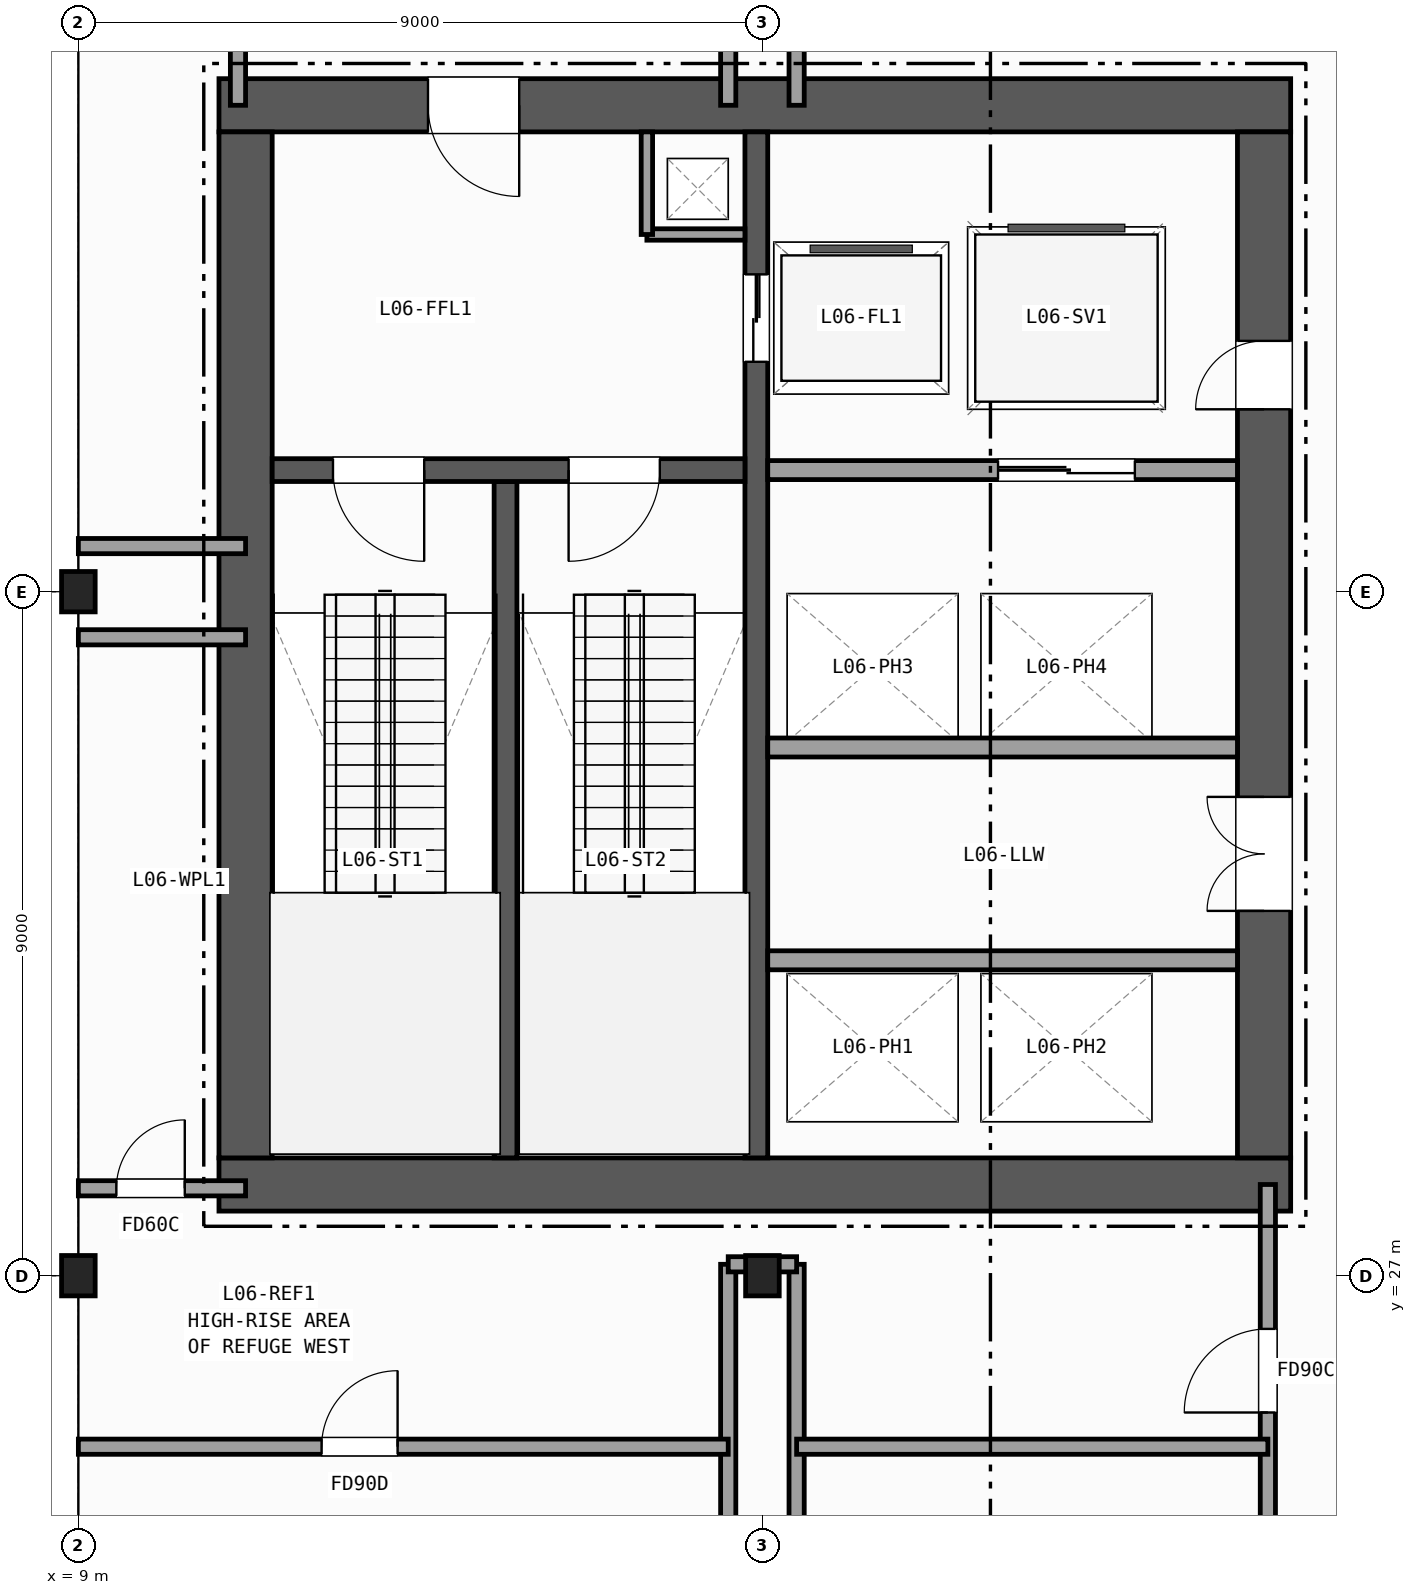
"""IFC4 building model, lengths in metres.
Left out: names, types, materials, properties, quantities, classifications, styles, units other than length and angle.
Written with IfcOpenShell. Run it as: python <this file> out.ifc"""

import sys

from ifc_helpers import new_model, si_unit, direction, frame, frame_2d, origin, origin_2d, place, context, subcontext, project, spatial, rectangle, i_section, extrude, element, fill, save


model = new_model("IFC4")
c1 = context("Model", 3, precision=1e-05, world=origin(), true_north=direction((0.0, 1.0)))
c2 = subcontext(c1, "Body", "Model", "MODEL_VIEW")
j1 = project(units=[si_unit("LENGTHUNIT", "METRE"), si_unit("PLANEANGLEUNIT", "RADIAN")], contexts=[c1])
p1 = place(None, origin())
s1 = spatial("IfcSite", under=j1, at=p1, CompositionType="ELEMENT")
p2 = place(p1, origin())
s2 = spatial("IfcBuilding", under=s1, at=p2, CompositionType="ELEMENT")
p3 = place(p2, frame((0.0, 0.0, 30.8)))
s3 = spatial("IfcBuildingStorey", under=s2, at=p3, CompositionType="ELEMENT", Elevation=30.8)
for number, where, z_axis, x_axis in (
    (1, (9.0, 27.0, 0.0), (0.0, 0.0, 1.0), (1.0, 0.0, 0.0)),
    (2, (9.0, 36.0, 0.0), (0.0, 0.0, 1.0), (1.0, 0.0, 0.0)),
    (3, (18.0, 27.0, 0.0), (0.0, 0.0, 1.0), (1.0, 0.0, 0.0)),
):
    element("IfcColumn", number, at=place(p3, frame(where, z_axis=z_axis, x_axis=x_axis)), inside=s3, PredefinedType="COLUMN", context=c2, shape_type="SweptSolid", body=[
        extrude(i_section(OverallWidth=0.442, OverallDepth=0.531, WebThickness=0.066, FlangeThickness=0.106, FilletRadius=0.015, at=origin_2d()), origin(), (0.0, 0.0, 1.0), 5.2),
    ])
p4 = place(p3, frame((10.85, 28.2, 0.0), z_axis=(0.0, 0.0, 1.0), x_axis=(1.0, 0.0, 0.0)))
e4 = element("IfcWall", 4, at=p4, inside=s3, PredefinedType="SHEAR", context=c2, shape_type="SweptSolid", body=[
    extrude(rectangle(XDim=14.1, YDim=0.7, at=frame_2d((7.05, 0.0))), origin(), (0.0, 0.0, 1.0), 4.92),
])
p5 = place(p3, frame((24.95, 42.4, 0.0), z_axis=(0.0, 0.0, 1.0), x_axis=(-1.0, 0.0, 0.0)))
e5 = element("IfcWall", 5, at=p5, inside=s3, PredefinedType="SHEAR", context=c2, shape_type="SweptSolid", body=[
    extrude(rectangle(XDim=14.1, YDim=0.7, at=frame_2d((7.05, 0.0))), origin(), (0.0, 0.0, 1.0), 4.92),
])
p6 = place(p5, frame((10.15, 0.0, 0.0)))
e6 = element("IfcOpeningElement", 6, at=p6, cuts=e5, PredefinedType="OPENING", context=c2, shape_type="SweptSolid", body=[
    extrude(rectangle(XDim=1.2, YDim=2.15, at=frame_2d((0.6, 1.075))), frame((0.0, 0.36, 0.0), z_axis=(0.0, -1.0, 0.0), x_axis=(1.0, 0.0, 0.0)), (0.0, 0.0, 1.0), 0.72),
])
p7 = place(p3, frame((11.2, 42.05, 0.0), z_axis=(0.0, 0.0, 1.0), x_axis=(0.0, -1.0, 0.0)))
e7 = element("IfcWall", 7, at=p7, inside=s3, PredefinedType="SHEAR", context=c2, shape_type="SweptSolid", body=[
    extrude(rectangle(XDim=13.5, YDim=0.7, at=frame_2d((6.75, 0.0))), origin(), (0.0, 0.0, 1.0), 4.92),
])
p8 = place(p3, frame((24.6, 28.55, 0.0), z_axis=(0.0, 0.0, 1.0), x_axis=(0.0, 1.0, 0.0)))
e8 = element("IfcWall", 8, at=p8, inside=s3, PredefinedType="SHEAR", context=c2, shape_type="SweptSolid", body=[
    extrude(rectangle(XDim=13.5, YDim=0.7, at=frame_2d((6.75, 0.0))), origin(), (0.0, 0.0, 1.0), 4.92),
])
p9 = place(p8, frame((3.25, 0.0, 0.0)))
e9 = element("IfcOpeningElement", 9, at=p9, cuts=e8, PredefinedType="OPENING", context=c2, shape_type="SweptSolid", body=[
    extrude(rectangle(XDim=1.5, YDim=2.2, at=frame_2d((0.75, 1.1))), frame((0.0, 0.36, 0.0), z_axis=(0.0, -1.0, 0.0), x_axis=(1.0, 0.0, 0.0)), (0.0, 0.0, 1.0), 0.72),
])
p10 = place(p8, frame((9.85, 0.0, 0.0)))
e10 = element("IfcOpeningElement", 10, at=p10, cuts=e8, PredefinedType="OPENING", context=c2, shape_type="SweptSolid", body=[
    extrude(rectangle(XDim=0.9, YDim=2.1, at=frame_2d((0.45, 1.05))), frame((0.0, 0.36, 0.0), z_axis=(0.0, -1.0, 0.0), x_axis=(1.0, 0.0, 0.0)), (0.0, 0.0, 1.0), 0.72),
])
p11 = place(p3, frame((14.62, 28.55, 0.0), z_axis=(0.0, 0.0, 1.0), x_axis=(0.0, 1.0, 0.0)))
e11 = element("IfcWall", 11, at=p11, inside=s3, PredefinedType="SHEAR", context=c2, shape_type="SweptSolid", body=[
    extrude(rectangle(XDim=8.9, YDim=0.3, at=frame_2d((4.45, 0.0))), origin(), (0.0, 0.0, 1.0), 4.92),
])
p12 = place(p3, frame((17.92, 42.05, 0.0), z_axis=(0.0, 0.0, 1.0), x_axis=(0.0, -1.0, 0.0)))
e12 = element("IfcWall", 12, at=p12, inside=s3, PredefinedType="SHEAR", context=c2, shape_type="SweptSolid", body=[
    extrude(rectangle(XDim=13.5, YDim=0.3, at=frame_2d((6.75, 0.0))), origin(), (0.0, 0.0, 1.0), 4.92),
])
p13 = place(p12, frame((1.875, 0.0, 0.0)))
e13 = element("IfcOpeningElement", 13, at=p13, cuts=e12, PredefinedType="OPENING", context=c2, shape_type="SweptSolid", body=[
    extrude(rectangle(XDim=1.15, YDim=2.15, at=frame_2d((0.575, 1.075))), frame((0.0, 0.16, 0.0), z_axis=(0.0, -1.0, 0.0), x_axis=(1.0, 0.0, 0.0)), (0.0, 0.0, 1.0), 0.32),
])
p14 = place(p3, frame((17.77, 37.6, 0.0), z_axis=(0.0, 0.0, 1.0), x_axis=(-1.0, 0.0, 0.0)))
e14 = element("IfcWall", 14, at=p14, inside=s3, PredefinedType="SHEAR", context=c2, shape_type="SweptSolid", body=[
    extrude(rectangle(XDim=6.22, YDim=0.3, at=frame_2d((3.11, 0.0))), origin(), (0.0, 0.0, 1.0), 4.92),
])
p15 = place(p14, frame((4.22, 0.0, 0.0)))
e15 = element("IfcOpeningElement", 15, at=p15, cuts=e14, PredefinedType="OPENING", context=c2, shape_type="SweptSolid", body=[
    extrude(rectangle(XDim=1.2, YDim=2.15, at=frame_2d((0.6, 1.075))), frame((0.0, 0.16, 0.0), z_axis=(0.0, -1.0, 0.0), x_axis=(1.0, 0.0, 0.0)), (0.0, 0.0, 1.0), 0.32),
])
p16 = place(p14, frame((1.12, 0.0, 0.0)))
e16 = element("IfcOpeningElement", 16, at=p16, cuts=e14, PredefinedType="OPENING", context=c2, shape_type="SweptSolid", body=[
    extrude(rectangle(XDim=1.2, YDim=2.15, at=frame_2d((0.6, 1.075))), frame((0.0, 0.16, 0.0), z_axis=(0.0, -1.0, 0.0), x_axis=(1.0, 0.0, 0.0)), (0.0, 0.0, 1.0), 0.32),
])
p17 = place(p3, frame((16.48, 40.7, 0.0), z_axis=(0.0, 0.0, 1.0), x_axis=(1.0, 0.0, 0.0)))
e17 = element("IfcWall", 17, at=p17, inside=s3, PredefinedType="PARTITIONING", context=c2, shape_type="SweptSolid", body=[
    extrude(rectangle(XDim=1.29, YDim=0.15, at=frame_2d((0.645, 0.0))), origin(), (0.0, 0.0, 1.0), 4.92),
])
p18 = place(p3, frame((16.48, 40.7, 0.0), z_axis=(0.0, 0.0, 1.0), x_axis=(0.0, 1.0, 0.0)))
e18 = element("IfcWall", 18, at=p18, inside=s3, PredefinedType="PARTITIONING", context=c2, shape_type="SweptSolid", body=[
    extrude(rectangle(XDim=1.35, YDim=0.15, at=frame_2d((0.675, 0.0))), origin(), (0.0, 0.0, 1.0), 4.92),
])
p19 = place(p3, frame((18.07, 37.6, 0.0), z_axis=(0.0, 0.0, 1.0), x_axis=(1.0, 0.0, 0.0)))
e19 = element("IfcWall", 19, at=p19, inside=s3, PredefinedType="PARTITIONING", context=c2, shape_type="SweptSolid", body=[
    extrude(rectangle(XDim=6.18, YDim=0.25, at=frame_2d((3.09, 0.0))), origin(), (0.0, 0.0, 1.0), 4.92),
])
p20 = place(p19, frame((3.03, 0.0, 0.0)))
e20 = element("IfcOpeningElement", 20, at=p20, cuts=e19, PredefinedType="OPENING", context=c2, shape_type="SweptSolid", body=[
    extrude(rectangle(XDim=1.8, YDim=2.3, at=frame_2d((0.9, 1.15))), frame((0.0, 0.135, 0.0), z_axis=(0.0, -1.0, 0.0), x_axis=(1.0, 0.0, 0.0)), (0.0, 0.0, 1.0), 0.27),
])
for number, where, z_axis, x_axis in (
    (21, (18.07, 31.15, 0.0), (0.0, 0.0, 1.0), (1.0, 0.0, 0.0)),
    (22, (24.25, 33.95, 0.0), (0.0, 0.0, 1.0), (-1.0, 0.0, 0.0)),
):
    element("IfcWall", number, at=place(p3, frame(where, z_axis=z_axis, x_axis=x_axis)), inside=s3, PredefinedType="PARTITIONING", context=c2, shape_type="SweptSolid", body=[
        extrude(rectangle(XDim=6.18, YDim=0.25, at=frame_2d((3.09, 0.0))), origin(), (0.0, 0.0, 1.0), 4.92),
    ])
p21 = place(p3, frame((24.65, 9.0, 0.0), z_axis=(0.0, 0.0, 1.0), x_axis=(0.0, 1.0, 0.0)))
e23 = element("IfcWall", 23, at=p21, inside=s3, PredefinedType="PARTITIONING", context=c2, shape_type="SweptSolid", body=[
    extrude(rectangle(XDim=19.2, YDim=0.2, at=frame_2d((9.6, 0.0))), origin(), (0.0, 0.0, 1.0), 3.973),
])
p22 = place(p21, frame((6.5, 0.0, 0.0)))
e24 = element("IfcOpeningElement", 24, at=p22, cuts=e23, PredefinedType="OPENING", context=c2, shape_type="SweptSolid", body=[
    extrude(rectangle(XDim=1.1, YDim=2.15, at=frame_2d((0.55, 1.075))), frame((0.0, 0.11, 0.0), z_axis=(0.0, -1.0, 0.0), x_axis=(1.0, 0.0, 0.0)), (0.0, 0.0, 1.0), 0.22),
])
p23 = place(p21, frame((16.2, 0.0, 0.0)))
e25 = element("IfcOpeningElement", 25, at=p23, cuts=e23, PredefinedType="OPENING", context=c2, shape_type="SweptSolid", body=[
    extrude(rectangle(XDim=1.1, YDim=2.15, at=frame_2d((0.55, 1.075))), frame((0.0, 0.11, 0.0), z_axis=(0.0, -1.0, 0.0), x_axis=(1.0, 0.0, 0.0)), (0.0, 0.0, 1.0), 0.22),
])
for number, where, z_axis, x_axis in (
    (26, (17.55, 9.0, 0.0), (0.0, 0.0, 1.0), (0.0, 1.0, 0.0)),
    (27, (18.45, 9.0, 0.0), (0.0, 0.0, 1.0), (0.0, 1.0, 0.0)),
):
    element("IfcWall", number, at=place(p3, frame(where, z_axis=z_axis, x_axis=x_axis)), inside=s3, PredefinedType="PARTITIONING", context=c2, shape_type="SweptSolid", body=[
        extrude(rectangle(XDim=18.15, YDim=0.2, at=frame_2d((9.075, 0.0))), origin(), (0.0, 0.0, 1.0), 3.973),
    ])
p24 = place(p3, frame((17.55, 27.15, 0.0), z_axis=(0.0, 0.0, 1.0), x_axis=(1.0, 0.0, 0.0)))
e28 = element("IfcWall", 28, at=p24, inside=s3, PredefinedType="PARTITIONING", context=c2, shape_type="SweptSolid", body=[
    extrude(rectangle(XDim=0.9, YDim=0.2, at=frame_2d((0.45, 0.0))), origin(), (0.0, 0.0, 1.0), 3.973),
])
p25 = place(p3, frame((9.0, 24.75, 0.0), z_axis=(0.0, 0.0, 1.0), x_axis=(1.0, 0.0, 0.0)))
e29 = element("IfcWall", 29, at=p25, inside=s3, PredefinedType="PARTITIONING", context=c2, shape_type="SweptSolid", body=[
    extrude(rectangle(XDim=8.55, YDim=0.2, at=frame_2d((4.275, 0.0))), origin(), (0.0, 0.0, 1.0), 4.127),
])
p26 = place(p25, frame((3.2, 0.0, 0.0)))
e30 = element("IfcOpeningElement", 30, at=p26, cuts=e29, PredefinedType="OPENING", context=c2, shape_type="SweptSolid", body=[
    extrude(rectangle(XDim=1.0, YDim=2.15, at=frame_2d((0.5, 1.075))), frame((0.0, 0.11, 0.0), z_axis=(0.0, -1.0, 0.0), x_axis=(1.0, 0.0, 0.0)), (0.0, 0.0, 1.0), 0.22),
])
p27 = place(p3, frame((18.45, 24.75, 0.0), z_axis=(0.0, 0.0, 1.0), x_axis=(1.0, 0.0, 0.0)))
e31 = element("IfcWall", 31, at=p27, inside=s3, PredefinedType="PARTITIONING", context=c2, shape_type="SweptSolid", body=[
    extrude(rectangle(XDim=6.2, YDim=0.2, at=frame_2d((3.1, 0.0))), origin(), (0.0, 0.0, 1.0), 4.92),
])
p28 = place(p3, frame((9.0, 28.15, 0.0), z_axis=(0.0, 0.0, 1.0), x_axis=(1.0, 0.0, 0.0)))
e32 = element("IfcWall", 32, at=p28, inside=s3, PredefinedType="PARTITIONING", context=c2, shape_type="SweptSolid", body=[
    extrude(rectangle(XDim=2.2, YDim=0.2, at=frame_2d((1.1, 0.0))), origin(), (0.0, 0.0, 1.0), 4.127),
])
p29 = place(p28, frame((0.5, 0.0, 0.0)))
e33 = element("IfcOpeningElement", 33, at=p29, cuts=e32, PredefinedType="OPENING", context=c2, shape_type="SweptSolid", body=[
    extrude(rectangle(XDim=0.9, YDim=2.1, at=frame_2d((0.45, 1.05))), frame((0.0, 0.11, 0.0), z_axis=(0.0, -1.0, 0.0), x_axis=(1.0, 0.0, 0.0)), (0.0, 0.0, 1.0), 0.22),
])
for number, where, z_axis, x_axis in (
    (34, (9.0, 35.4, 0.0), (0.0, 0.0, 1.0), (1.0, 0.0, 0.0)),
    (35, (9.0, 36.6, 0.0), (0.0, 0.0, 1.0), (1.0, 0.0, 0.0)),
):
    element("IfcWall", number, at=place(p3, frame(where, z_axis=z_axis, x_axis=x_axis)), inside=s3, PredefinedType="PARTITIONING", context=c2, shape_type="SweptSolid", body=[
        extrude(rectangle(XDim=2.2, YDim=0.2, at=frame_2d((1.1, 0.0))), origin(), (0.0, 0.0, 1.0), 4.127),
    ])
for number, where, z_axis, x_axis in (
    (36, (17.55, 42.4, 0.0), (0.0, 0.0, 1.0), (0.0, 1.0, 0.0)),
    (37, (18.45, 42.4, 0.0), (0.0, 0.0, 1.0), (0.0, 1.0, 0.0)),
):
    element("IfcWall", number, at=place(p3, frame(where, z_axis=z_axis, x_axis=x_axis)), inside=s3, PredefinedType="PARTITIONING", context=c2, shape_type="SweptSolid", body=[
        extrude(rectangle(XDim=2.8, YDim=0.2, at=frame_2d((1.4, 0.0))), origin(), (0.0, 0.0, 1.0), 3.973),
    ])
p30 = place(p3, frame((11.1, 42.4, 0.0), z_axis=(0.0, 0.0, 1.0), x_axis=(0.0, 1.0, 0.0)))
e38 = element("IfcWall", 38, at=p30, inside=s3, PredefinedType="PARTITIONING", context=c2, shape_type="SweptSolid", body=[
    extrude(rectangle(XDim=2.1, YDim=0.2, at=frame_2d((1.05, 0.0))), origin(), (0.0, 0.0, 1.0), 4.92),
])
p31 = place(p15, origin())
e39 = element("IfcDoor", 39, at=p31, inside=s3, OperationType="SINGLE_SWING_LEFT", PredefinedType="DOOR", context=c2, shape_type="SweptSolid", body=[
    extrude(rectangle(XDim=1.2, YDim=2.15, at=frame_2d((0.6, 1.075))), frame((0.0, 0.025, 0.0), z_axis=(0.0, -1.0, 0.0), x_axis=(1.0, 0.0, 0.0)), (0.0, 0.0, 1.0), 0.05),
])
fill(e15, e39)
p32 = place(p16, origin())
e40 = element("IfcDoor", 40, at=p32, inside=s3, OperationType="SINGLE_SWING_RIGHT", PredefinedType="DOOR", context=c2, shape_type="SweptSolid", body=[
    extrude(rectangle(XDim=1.2, YDim=2.15, at=frame_2d((0.6, 1.075))), frame((0.0, 0.025, 0.0), z_axis=(0.0, -1.0, 0.0), x_axis=(1.0, 0.0, 0.0)), (0.0, 0.0, 1.0), 0.05),
])
fill(e16, e40)
p33 = place(p9, origin())
e41 = element("IfcDoor", 41, at=p33, inside=s3, OperationType="DOUBLE_DOOR_SINGLE_SWING", PredefinedType="DOOR", context=c2, shape_type="SweptSolid", body=[
    extrude(rectangle(XDim=1.5, YDim=2.2, at=frame_2d((0.75, 1.1))), frame((0.0, 0.025, 0.0), z_axis=(0.0, -1.0, 0.0), x_axis=(1.0, 0.0, 0.0)), (0.0, 0.0, 1.0), 0.05),
])
fill(e9, e41)
p34 = place(p6, origin())
e42 = element("IfcDoor", 42, at=p34, inside=s3, OperationType="SINGLE_SWING_LEFT", PredefinedType="DOOR", context=c2, shape_type="SweptSolid", body=[
    extrude(rectangle(XDim=1.2, YDim=2.15, at=frame_2d((0.6, 1.075))), frame((0.0, 0.025, 0.0), z_axis=(0.0, -1.0, 0.0), x_axis=(1.0, 0.0, 0.0)), (0.0, 0.0, 1.0), 0.05),
])
fill(e6, e42)
p35 = place(p10, origin())
e43 = element("IfcDoor", 43, at=p35, inside=s3, OperationType="SINGLE_SWING_LEFT", PredefinedType="DOOR", context=c2, shape_type="SweptSolid", body=[
    extrude(rectangle(XDim=0.9, YDim=2.1, at=frame_2d((0.45, 1.05))), frame((0.0, 0.025, 0.0), z_axis=(0.0, -1.0, 0.0), x_axis=(1.0, 0.0, 0.0)), (0.0, 0.0, 1.0), 0.05),
])
fill(e10, e43)
p36 = place(p13, origin())
e44 = element("IfcDoor", 44, at=p36, inside=s3, OperationType="DOUBLE_DOOR_SLIDING", PredefinedType="DOOR", context=c2, shape_type="SweptSolid", body=[
    extrude(rectangle(XDim=1.15, YDim=2.15, at=frame_2d((0.575, 1.075))), frame((0.0, 0.025, 0.0), z_axis=(0.0, -1.0, 0.0), x_axis=(1.0, 0.0, 0.0)), (0.0, 0.0, 1.0), 0.05),
])
fill(e13, e44)
p37 = place(p20, origin())
e45 = element("IfcDoor", 45, at=p37, inside=s3, OperationType="DOUBLE_DOOR_SLIDING", PredefinedType="DOOR", context=c2, shape_type="SweptSolid", body=[
    extrude(rectangle(XDim=1.8, YDim=2.3, at=frame_2d((0.9, 1.15))), frame((0.0, 0.025, 0.0), z_axis=(0.0, -1.0, 0.0), x_axis=(1.0, 0.0, 0.0)), (0.0, 0.0, 1.0), 0.05),
])
fill(e20, e45)
p38 = place(p26, origin())
e46 = element("IfcDoor", 46, at=p38, inside=s3, OperationType="SINGLE_SWING_RIGHT", PredefinedType="DOOR", context=c2, shape_type="SweptSolid", body=[
    extrude(rectangle(XDim=1.0, YDim=2.15, at=frame_2d((0.5, 1.075))), frame((0.0, 0.025, 0.0), z_axis=(0.0, -1.0, 0.0), x_axis=(1.0, 0.0, 0.0)), (0.0, 0.0, 1.0), 0.05),
])
fill(e30, e46)
p39 = place(p23, origin())
e47 = element("IfcDoor", 47, at=p39, inside=s3, OperationType="SINGLE_SWING_LEFT", PredefinedType="DOOR", context=c2, shape_type="SweptSolid", body=[
    extrude(rectangle(XDim=1.1, YDim=2.15, at=frame_2d((0.55, 1.075))), frame((0.0, 0.025, 0.0), z_axis=(0.0, -1.0, 0.0), x_axis=(1.0, 0.0, 0.0)), (0.0, 0.0, 1.0), 0.05),
])
fill(e25, e47)
p40 = place(p29, origin())
e48 = element("IfcDoor", 48, at=p40, inside=s3, OperationType="SINGLE_SWING_RIGHT", PredefinedType="DOOR", context=c2, shape_type="SweptSolid", body=[
    extrude(rectangle(XDim=0.9, YDim=2.1, at=frame_2d((0.45, 1.05))), frame((0.0, 0.025, 0.0), z_axis=(0.0, -1.0, 0.0), x_axis=(1.0, 0.0, 0.0)), (0.0, 0.0, 1.0), 0.05),
])
fill(e33, e48)
save(model, sys.argv[1])
